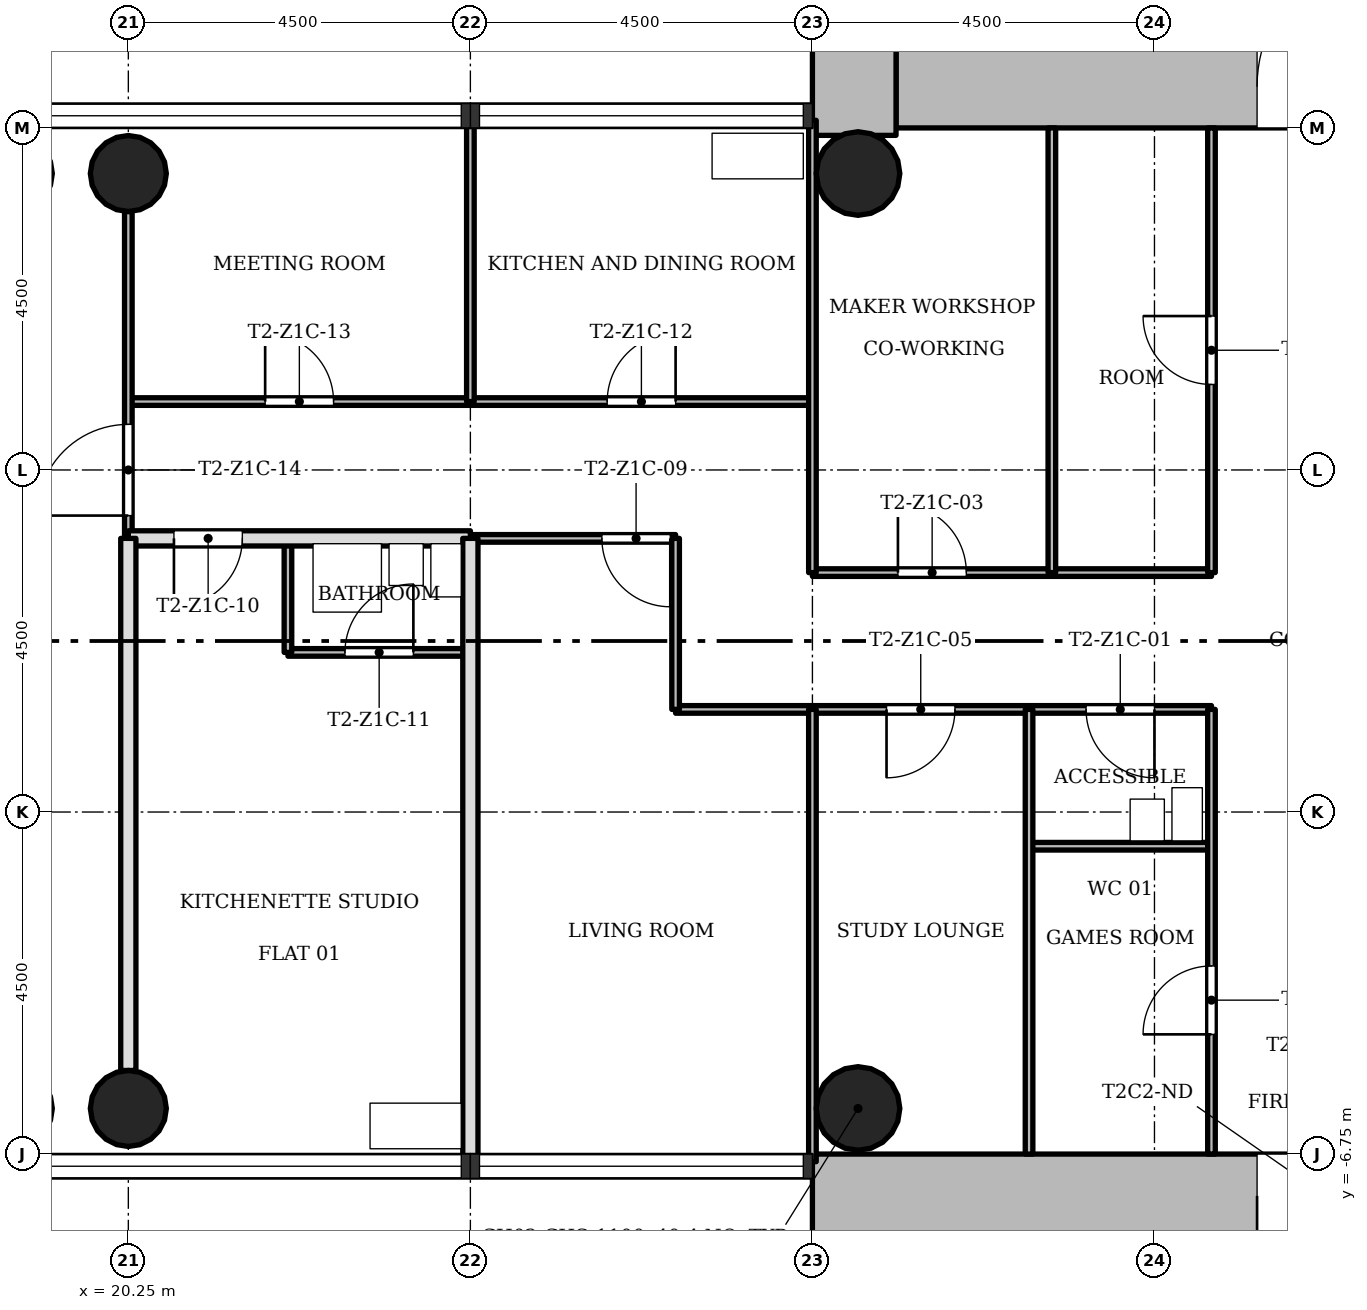
"""IFC4 building model, lengths in metres.
Left out: names, types, materials, properties, quantities, classifications, styles, units other than length and angle.
Written with IfcOpenShell. Run it as: python <this file> out.ifc"""

import sys

from ifc_helpers import new_model, si_unit, direction, frame, frame_2d, origin, origin_2d, place, context, subcontext, project, spatial, rectangle, hollow_circle, extrude, element, fill, save


model = new_model("IFC4")
c1 = context("Model", 3, precision=1e-05, world=origin(), true_north=direction((0.0, 1.0)))
c2 = subcontext(c1, "Body", "Model", "MODEL_VIEW")
j1 = project(units=[si_unit("LENGTHUNIT", "METRE"), si_unit("PLANEANGLEUNIT", "RADIAN")], contexts=[c1])
p1 = place(None, origin())
s1 = spatial("IfcSite", under=j1, at=p1, CompositionType="ELEMENT")
p2 = place(p1, origin())
s2 = spatial("IfcBuilding", under=s1, at=p2, CompositionType="ELEMENT")
p3 = place(p2, frame((0.0, 0.0, 48.3)))
s3 = spatial("IfcBuildingStorey", under=s2, at=p3, CompositionType="ELEMENT", Elevation=48.3)
p4 = place(p3, frame((30.35, 7.3, 0.0), z_axis=(0.0, 0.0, 1.0), x_axis=(1.0, 0.0, 0.0)))
e1 = element("IfcWall", 1, at=p4, inside=s3, PredefinedType="SHEAR", context=c2, shape_type="SweptSolid", body=[
    extrude(rectangle(XDim=12.4, YDim=1.1, at=frame_2d((6.2, 0.0))), origin(), (0.0, 0.0, 1.0), 3.4),
])
p5 = place(p4, frame((4.75, 0.0, 0.0)))
e2 = element("IfcOpeningElement", 2, at=p5, cuts=e1, PredefinedType="OPENING", context=c2, shape_type="SweptSolid", body=[
    extrude(rectangle(XDim=1.8, YDim=2.1, at=frame_2d((0.9, 1.05))), frame((0.0, 0.56, 0.0), z_axis=(0.0, -1.0, 0.0), x_axis=(1.0, 0.0, 0.0)), (0.0, 0.0, 1.0), 1.12),
])
p6 = place(p3, frame((29.8, 15.248, 0.0), z_axis=(0.0, 0.0, 1.0), x_axis=(0.0, -1.0, 0.0)))
e3 = element("IfcWall", 3, at=p6, inside=s3, PredefinedType="SHEAR", context=c2, shape_type="SweptSolid", body=[
    extrude(rectangle(XDim=8.596, YDim=1.1, at=frame_2d((4.298, 0.0))), origin(), (0.0, 0.0, 1.0), 3.4),
])
p7 = place(p3, frame((41.65, -7.3, 0.0), z_axis=(0.0, 0.0, 1.0), x_axis=(-1.0, 0.0, 0.0)))
e4 = element("IfcWall", 4, at=p7, inside=s3, PredefinedType="SHEAR", context=c2, shape_type="SweptSolid", body=[
    extrude(rectangle(XDim=12.4, YDim=1.1, at=frame_2d((6.2, 0.0))), origin(), (0.0, 0.0, 1.0), 3.4),
])
p8 = place(p7, frame((4.75, 0.0, 0.0)))
e5 = element("IfcOpeningElement", 5, at=p8, cuts=e4, PredefinedType="OPENING", context=c2, shape_type="SweptSolid", body=[
    extrude(rectangle(XDim=1.8, YDim=2.1, at=frame_2d((0.9, 1.05))), frame((0.0, 0.56, 0.0), z_axis=(0.0, -1.0, 0.0), x_axis=(1.0, 0.0, 0.0)), (0.0, 0.0, 1.0), 1.12),
])
for number, where, z_axis, x_axis in (
    (6, (20.25, 6.15, 0.0), (0.0, 0.0, 1.0), (1.0, 0.0, 0.0)),
    (7, (20.25, -6.15, 0.0), (0.0, 0.0, 1.0), (1.0, 0.0, 0.0)),
):
    element("IfcColumn", number, at=place(p3, frame(where, z_axis=z_axis, x_axis=x_axis)), inside=s3, PredefinedType="COLUMN", context=c2, shape_type="SweptSolid", body=[
        extrude(hollow_circle(Radius=0.5, WallThickness=0.036, at=origin_2d()), origin(), (0.0, 0.0, 1.0), 3.4),
    ])
for number, where, z_axis, x_axis in (
    (8, (29.85, 6.15, 0.0), (0.0, 0.0, 1.0), (1.0, 0.0, 0.0)),
    (9, (29.85, -6.15, 0.0), (0.0, 0.0, 1.0), (1.0, 0.0, 0.0)),
):
    element("IfcColumn", number, at=place(p3, frame(where, z_axis=z_axis, x_axis=x_axis)), inside=s3, PredefinedType="COLUMN", context=c2, shape_type="SweptSolid", body=[
        extrude(hollow_circle(Radius=0.55, WallThickness=0.04, at=origin_2d()), origin(), (0.0, 0.0, 1.0), 3.4),
    ])
p9 = place(p3, frame((34.5, -2.7, 0.0), z_axis=(0.0, 0.0, 1.0), x_axis=(-1.0, 0.0, 0.0)))
e10 = element("IfcWall", 10, at=p9, inside=s3, PredefinedType="PARTITIONING", context=c2, shape_type="SweptSolid", body=[
    extrude(rectangle(XDim=2.4, YDim=0.1, at=frame_2d((1.2, 0.0))), origin(), (0.0, 0.0, 1.0), 3.0),
])
p10 = place(p3, frame((34.5, -0.9, 0.0), z_axis=(0.0, 0.0, 1.0), x_axis=(-1.0, 0.0, 0.0)))
e11 = element("IfcWall", 11, at=p10, inside=s3, PredefinedType="PARTITIONING", context=c2, shape_type="SweptSolid", body=[
    extrude(rectangle(XDim=7.05, YDim=0.1, at=frame_2d((3.525, 0.0))), origin(), (0.0, 0.0, 1.0), 3.0),
])
p11 = place(p10, frame((0.75, 0.0, 0.0)))
e12 = element("IfcOpeningElement", 12, at=p11, cuts=e11, PredefinedType="OPENING", context=c2, shape_type="SweptSolid", body=[
    extrude(rectangle(XDim=0.9, YDim=2.1, at=frame_2d((0.45, 1.05))), frame((0.0, 0.06, 0.0), z_axis=(0.0, -1.0, 0.0), x_axis=(1.0, 0.0, 0.0)), (0.0, 0.0, 1.0), 0.12),
])
p12 = place(p10, frame((3.375, 0.0, 0.0)))
e13 = element("IfcOpeningElement", 13, at=p12, cuts=e11, PredefinedType="OPENING", context=c2, shape_type="SweptSolid", body=[
    extrude(rectangle(XDim=0.9, YDim=2.1, at=frame_2d((0.45, 1.05))), frame((0.0, 0.06, 0.0), z_axis=(0.0, -1.0, 0.0), x_axis=(1.0, 0.0, 0.0)), (0.0, 0.0, 1.0), 0.12),
])
p13 = place(p3, frame((24.75, -0.15, 0.0), z_axis=(0.0, 0.0, 1.0), x_axis=(-1.0, 0.0, 0.0)))
e14 = element("IfcWall", 14, at=p13, inside=s3, PredefinedType="PARTITIONING", context=c2, shape_type="SweptSolid", body=[
    extrude(rectangle(XDim=2.4, YDim=0.1, at=frame_2d((1.2, 0.0))), origin(), (0.0, 0.0, 1.0), 3.0),
])
p14 = place(p13, frame((0.75, 0.0, 0.0)))
e15 = element("IfcOpeningElement", 15, at=p14, cuts=e14, PredefinedType="OPENING", context=c2, shape_type="SweptSolid", body=[
    extrude(rectangle(XDim=0.9, YDim=2.1, at=frame_2d((0.45, 1.05))), frame((0.0, 0.06, 0.0), z_axis=(0.0, -1.0, 0.0), x_axis=(1.0, 0.0, 0.0)), (0.0, 0.0, 1.0), 0.12),
])
p15 = place(p3, frame((34.5, 0.9, 0.0), z_axis=(0.0, 0.0, 1.0), x_axis=(-1.0, 0.0, 0.0)))
e16 = element("IfcWall", 16, at=p15, inside=s3, PredefinedType="PARTITIONING", context=c2, shape_type="SweptSolid", body=[
    extrude(rectangle(XDim=5.25, YDim=0.1, at=frame_2d((2.625, 0.0))), origin(), (0.0, 0.0, 1.0), 3.0),
])
p16 = place(p15, frame((3.225, 0.0, 0.0)))
e17 = element("IfcOpeningElement", 17, at=p16, cuts=e16, PredefinedType="OPENING", context=c2, shape_type="SweptSolid", body=[
    extrude(rectangle(XDim=0.9, YDim=2.1, at=frame_2d((0.45, 1.05))), frame((0.0, 0.06, 0.0), z_axis=(0.0, -1.0, 0.0), x_axis=(1.0, 0.0, 0.0)), (0.0, 0.0, 1.0), 0.12),
])
p17 = place(p3, frame((27.45, 1.35, 0.0), z_axis=(0.0, 0.0, 1.0), x_axis=(-1.0, 0.0, 0.0)))
e18 = element("IfcWall", 18, at=p17, inside=s3, PredefinedType="PARTITIONING", context=c2, shape_type="SweptSolid", body=[
    extrude(rectangle(XDim=2.7, YDim=0.1, at=frame_2d((1.35, 0.0))), origin(), (0.0, 0.0, 1.0), 3.0),
])
p18 = place(p17, frame((0.07, 0.0, 0.0)))
e19 = element("IfcOpeningElement", 19, at=p18, cuts=e18, PredefinedType="OPENING", context=c2, shape_type="SweptSolid", body=[
    extrude(rectangle(XDim=0.9, YDim=2.1, at=frame_2d((0.45, 1.05))), frame((0.0, 0.06, 0.0), z_axis=(0.0, -1.0, 0.0), x_axis=(1.0, 0.0, 0.0)), (0.0, 0.0, 1.0), 0.12),
])
p19 = place(p3, frame((24.75, 1.35, 0.0), z_axis=(0.0, 0.0, 1.0), x_axis=(-1.0, 0.0, 0.0)))
e20 = element("IfcWall", 20, at=p19, inside=s3, PredefinedType="SOLIDWALL", context=c2, shape_type="SweptSolid", body=[
    extrude(rectangle(XDim=4.5, YDim=0.2, at=frame_2d((2.25, 0.0))), origin(), (0.0, 0.0, 1.0), 3.0),
])
p20 = place(p19, frame((3.0, 0.0, 0.0)))
e21 = element("IfcOpeningElement", 21, at=p20, cuts=e20, PredefinedType="OPENING", context=c2, shape_type="SweptSolid", body=[
    extrude(rectangle(XDim=0.9, YDim=2.1, at=frame_2d((0.45, 1.05))), frame((0.0, 0.11, 0.0), z_axis=(0.0, -1.0, 0.0), x_axis=(1.0, 0.0, 0.0)), (0.0, 0.0, 1.0), 0.22),
])
p21 = place(p3, frame((29.25, 3.15, 0.0), z_axis=(0.0, 0.0, 1.0), x_axis=(-1.0, 0.0, 0.0)))
e22 = element("IfcWall", 22, at=p21, inside=s3, PredefinedType="PARTITIONING", context=c2, shape_type="SweptSolid", body=[
    extrude(rectangle(XDim=9.0, YDim=0.1, at=frame_2d((4.5, 0.0))), origin(), (0.0, 0.0, 1.0), 3.0),
])
p22 = place(p21, frame((1.8, 0.0, 0.0)))
e23 = element("IfcOpeningElement", 23, at=p22, cuts=e22, PredefinedType="OPENING", context=c2, shape_type="SweptSolid", body=[
    extrude(rectangle(XDim=0.9, YDim=2.1, at=frame_2d((0.45, 1.05))), frame((0.0, 0.06, 0.0), z_axis=(0.0, -1.0, 0.0), x_axis=(1.0, 0.0, 0.0)), (0.0, 0.0, 1.0), 0.12),
])
p23 = place(p21, frame((6.3, 0.0, 0.0)))
e24 = element("IfcOpeningElement", 24, at=p23, cuts=e22, PredefinedType="OPENING", context=c2, shape_type="SweptSolid", body=[
    extrude(rectangle(XDim=0.9, YDim=2.1, at=frame_2d((0.45, 1.05))), frame((0.0, 0.06, 0.0), z_axis=(0.0, -1.0, 0.0), x_axis=(1.0, 0.0, 0.0)), (0.0, 0.0, 1.0), 0.12),
])
p24 = place(p3, frame((34.5, -6.75, 0.0), z_axis=(0.0, 0.0, 1.0), x_axis=(0.0, 1.0, 0.0)))
e25 = element("IfcWall", 25, at=p24, inside=s3, PredefinedType="PARTITIONING", context=c2, shape_type="SweptSolid", body=[
    extrude(rectangle(XDim=5.85, YDim=0.1, at=frame_2d((2.925, 0.0))), origin(), (0.0, 0.0, 1.0), 3.0),
])
p25 = place(p24, frame((1.575, 0.0, 0.0)))
e26 = element("IfcOpeningElement", 26, at=p25, cuts=e25, PredefinedType="OPENING", context=c2, shape_type="SweptSolid", body=[
    extrude(rectangle(XDim=0.9, YDim=2.1, at=frame_2d((0.45, 1.05))), frame((0.0, 0.06, 0.0), z_axis=(0.0, -1.0, 0.0), x_axis=(1.0, 0.0, 0.0)), (0.0, 0.0, 1.0), 0.12),
])
p26 = place(p3, frame((34.5, 0.9, 0.0), z_axis=(0.0, 0.0, 1.0), x_axis=(0.0, 1.0, 0.0)))
e27 = element("IfcWall", 27, at=p26, inside=s3, PredefinedType="PARTITIONING", context=c2, shape_type="SweptSolid", body=[
    extrude(rectangle(XDim=5.85, YDim=0.1, at=frame_2d((2.925, 0.0))), origin(), (0.0, 0.0, 1.0), 3.0),
])
p27 = place(p26, frame((2.475, 0.0, 0.0)))
e28 = element("IfcOpeningElement", 28, at=p27, cuts=e27, PredefinedType="OPENING", context=c2, shape_type="SweptSolid", body=[
    extrude(rectangle(XDim=0.9, YDim=2.1, at=frame_2d((0.45, 1.05))), frame((0.0, 0.06, 0.0), z_axis=(0.0, -1.0, 0.0), x_axis=(1.0, 0.0, 0.0)), (0.0, 0.0, 1.0), 0.12),
])
for number, where, z_axis, x_axis in (
    (29, (32.4, 0.9, 0.0), (0.0, 0.0, 1.0), (0.0, 1.0, 0.0)),
    (30, (32.1, -6.75, 0.0), (0.0, 0.0, 1.0), (0.0, 1.0, 0.0)),
):
    element("IfcWall", number, at=place(p3, frame(where, z_axis=z_axis, x_axis=x_axis)), inside=s3, PredefinedType="PARTITIONING", context=c2, shape_type="SweptSolid", body=[
        extrude(rectangle(XDim=5.85, YDim=0.1, at=frame_2d((2.925, 0.0))), origin(), (0.0, 0.0, 1.0), 3.0),
    ])
for number, where, z_axis, x_axis in (
    (31, (29.25, -6.85, 0.0), (0.0, 0.0, 1.0), (0.0, 1.0, 0.0)),
    (32, (29.25, 0.9, 0.0), (0.0, 0.0, 1.0), (0.0, 1.0, 0.0)),
):
    element("IfcWall", number, at=place(p3, frame(where, z_axis=z_axis, x_axis=x_axis)), inside=s3, PredefinedType="PARTITIONING", context=c2, shape_type="SweptSolid", body=[
        extrude(rectangle(XDim=5.95, YDim=0.1, at=frame_2d((2.975, 0.0))), origin(), (0.0, 0.0, 1.0), 3.0),
    ])
p28 = place(p3, frame((27.45, -0.9, 0.0), z_axis=(0.0, 0.0, 1.0), x_axis=(0.0, 1.0, 0.0)))
e33 = element("IfcWall", 33, at=p28, inside=s3, PredefinedType="PARTITIONING", context=c2, shape_type="SweptSolid", body=[
    extrude(rectangle(XDim=2.25, YDim=0.1, at=frame_2d((1.125, 0.0))), origin(), (0.0, 0.0, 1.0), 3.0),
])
p29 = place(p3, frame((24.75, 3.15, 0.0), z_axis=(0.0, 0.0, 1.0), x_axis=(0.0, 1.0, 0.0)))
e34 = element("IfcWall", 34, at=p29, inside=s3, PredefinedType="PARTITIONING", context=c2, shape_type="SweptSolid", body=[
    extrude(rectangle(XDim=3.7, YDim=0.1, at=frame_2d((1.85, 0.0))), origin(), (0.0, 0.0, 1.0), 3.0),
])
p30 = place(p3, frame((24.75, -6.85, 0.0), z_axis=(0.0, 0.0, 1.0), x_axis=(0.0, 1.0, 0.0)))
e35 = element("IfcWall", 35, at=p30, inside=s3, PredefinedType="SOLIDWALL", context=c2, shape_type="SweptSolid", body=[
    extrude(rectangle(XDim=8.2, YDim=0.2, at=frame_2d((4.1, 0.0))), origin(), (0.0, 0.0, 1.0), 3.0),
])
p31 = place(p3, frame((22.35, -0.15, 0.0), z_axis=(0.0, 0.0, 1.0), x_axis=(0.0, 1.0, 0.0)))
e36 = element("IfcWall", 36, at=p31, inside=s3, PredefinedType="PARTITIONING", context=c2, shape_type="SweptSolid", body=[
    extrude(rectangle(XDim=1.5, YDim=0.1, at=frame_2d((0.75, 0.0))), origin(), (0.0, 0.0, 1.0), 3.0),
])
p32 = place(p3, frame((20.25, 1.35, 0.0), z_axis=(0.0, 0.0, 1.0), x_axis=(0.0, 1.0, 0.0)))
e37 = element("IfcWall", 37, at=p32, inside=s3, PredefinedType="PARTITIONING", context=c2, shape_type="SweptSolid", body=[
    extrude(rectangle(XDim=4.3, YDim=0.1, at=frame_2d((2.15, 0.0))), origin(), (0.0, 0.0, 1.0), 3.0),
])
p33 = place(p32, frame((0.3, 0.0, 0.0)))
e38 = element("IfcOpeningElement", 38, at=p33, cuts=e37, PredefinedType="OPENING", context=c2, shape_type="SweptSolid", body=[
    extrude(rectangle(XDim=1.2, YDim=2.1, at=frame_2d((0.6, 1.05))), frame((0.0, 0.06, 0.0), z_axis=(0.0, -1.0, 0.0), x_axis=(1.0, 0.0, 0.0)), (0.0, 0.0, 1.0), 0.12),
])
p34 = place(p3, frame((20.25, -5.65, 0.0), z_axis=(0.0, 0.0, 1.0), x_axis=(0.0, 1.0, 0.0)))
e39 = element("IfcWall", 39, at=p34, inside=s3, PredefinedType="SOLIDWALL", context=c2, shape_type="SweptSolid", body=[
    extrude(rectangle(XDim=7.0, YDim=0.2, at=frame_2d((3.5, 0.0))), origin(), (0.0, 0.0, 1.0), 3.0),
])
p35 = place(p11, origin())
e40 = element("IfcDoor", 40, at=p35, inside=s3, OperationType="SINGLE_SWING_RIGHT", PredefinedType="DOOR", context=c2, shape_type="SweptSolid", body=[
    extrude(rectangle(XDim=0.9, YDim=2.1, at=frame_2d((0.45, 1.05))), frame((0.0, 0.025, 0.0), z_axis=(0.0, -1.0, 0.0), x_axis=(1.0, 0.0, 0.0)), (0.0, 0.0, 1.0), 0.05),
])
fill(e12, e40)
p36 = place(p27, origin())
e41 = element("IfcDoor", 41, at=p36, inside=s3, OperationType="SINGLE_SWING_LEFT", PredefinedType="DOOR", context=c2, shape_type="SweptSolid", body=[
    extrude(rectangle(XDim=0.9, YDim=2.1, at=frame_2d((0.45, 1.05))), frame((0.0, 0.025, 0.0), z_axis=(0.0, -1.0, 0.0), x_axis=(1.0, 0.0, 0.0)), (0.0, 0.0, 1.0), 0.05),
])
fill(e28, e41)
p37 = place(p16, origin())
e42 = element("IfcDoor", 42, at=p37, inside=s3, OperationType="SINGLE_SWING_RIGHT", PredefinedType="DOOR", context=c2, shape_type="SweptSolid", body=[
    extrude(rectangle(XDim=0.9, YDim=2.1, at=frame_2d((0.45, 1.05))), frame((0.0, 0.025, 0.0), z_axis=(0.0, -1.0, 0.0), x_axis=(1.0, 0.0, 0.0)), (0.0, 0.0, 1.0), 0.05),
])
fill(e17, e42)
p38 = place(p25, origin())
e43 = element("IfcDoor", 43, at=p38, inside=s3, OperationType="SINGLE_SWING_RIGHT", PredefinedType="DOOR", context=c2, shape_type="SweptSolid", body=[
    extrude(rectangle(XDim=0.9, YDim=2.1, at=frame_2d((0.45, 1.05))), frame((0.0, 0.025, 0.0), z_axis=(0.0, -1.0, 0.0), x_axis=(1.0, 0.0, 0.0)), (0.0, 0.0, 1.0), 0.05),
])
fill(e26, e43)
p39 = place(p12, origin())
e44 = element("IfcDoor", 44, at=p39, inside=s3, OperationType="SINGLE_SWING_LEFT", PredefinedType="DOOR", context=c2, shape_type="SweptSolid", body=[
    extrude(rectangle(XDim=0.9, YDim=2.1, at=frame_2d((0.45, 1.05))), frame((0.0, 0.025, 0.0), z_axis=(0.0, -1.0, 0.0), x_axis=(1.0, 0.0, 0.0)), (0.0, 0.0, 1.0), 0.05),
])
fill(e13, e44)
p40 = place(p18, origin())
e45 = element("IfcDoor", 45, at=p40, inside=s3, OperationType="SINGLE_SWING_RIGHT", PredefinedType="DOOR", context=c2, shape_type="SweptSolid", body=[
    extrude(rectangle(XDim=0.9, YDim=2.1, at=frame_2d((0.45, 1.05))), frame((0.0, 0.025, 0.0), z_axis=(0.0, -1.0, 0.0), x_axis=(1.0, 0.0, 0.0)), (0.0, 0.0, 1.0), 0.05),
])
fill(e19, e45)
p41 = place(p20, origin())
e46 = element("IfcDoor", 46, at=p41, inside=s3, OperationType="SINGLE_SWING_LEFT", PredefinedType="DOOR", context=c2, shape_type="SweptSolid", body=[
    extrude(rectangle(XDim=0.9, YDim=2.1, at=frame_2d((0.45, 1.05))), frame((0.0, 0.025, 0.0), z_axis=(0.0, -1.0, 0.0), x_axis=(1.0, 0.0, 0.0)), (0.0, 0.0, 1.0), 0.05),
])
fill(e21, e46)
p42 = place(p14, origin())
e47 = element("IfcDoor", 47, at=p42, inside=s3, OperationType="SINGLE_SWING_LEFT", PredefinedType="DOOR", context=c2, shape_type="SweptSolid", body=[
    extrude(rectangle(XDim=0.9, YDim=2.1, at=frame_2d((0.45, 1.05))), frame((0.0, 0.025, 0.0), z_axis=(0.0, -1.0, 0.0), x_axis=(1.0, 0.0, 0.0)), (0.0, 0.0, 1.0), 0.05),
])
fill(e15, e47)
p43 = place(p22, origin())
e48 = element("IfcDoor", 48, at=p43, inside=s3, OperationType="SINGLE_SWING_LEFT", PredefinedType="DOOR", context=c2, shape_type="SweptSolid", body=[
    extrude(rectangle(XDim=0.9, YDim=2.1, at=frame_2d((0.45, 1.05))), frame((0.0, 0.025, 0.0), z_axis=(0.0, -1.0, 0.0), x_axis=(1.0, 0.0, 0.0)), (0.0, 0.0, 1.0), 0.05),
])
fill(e23, e48)
p44 = place(p23, origin())
e49 = element("IfcDoor", 49, at=p44, inside=s3, OperationType="SINGLE_SWING_RIGHT", PredefinedType="DOOR", context=c2, shape_type="SweptSolid", body=[
    extrude(rectangle(XDim=0.9, YDim=2.1, at=frame_2d((0.45, 1.05))), frame((0.0, 0.025, 0.0), z_axis=(0.0, -1.0, 0.0), x_axis=(1.0, 0.0, 0.0)), (0.0, 0.0, 1.0), 0.05),
])
fill(e24, e49)
p45 = place(p33, origin())
e50 = element("IfcDoor", 50, at=p45, inside=s3, OperationType="SINGLE_SWING_RIGHT", PredefinedType="DOOR", context=c2, shape_type="SweptSolid", body=[
    extrude(rectangle(XDim=1.2, YDim=2.1, at=frame_2d((0.6, 1.05))), frame((0.0, 0.025, 0.0), z_axis=(0.0, -1.0, 0.0), x_axis=(1.0, 0.0, 0.0)), (0.0, 0.0, 1.0), 0.05),
])
fill(e38, e50)
p46 = place(p5, origin())
e51 = element("IfcDoor", 51, at=p46, inside=s3, OperationType="SINGLE_SWING_LEFT", PredefinedType="DOOR", context=c2, shape_type="SweptSolid", body=[
    extrude(rectangle(XDim=1.8, YDim=2.1, at=frame_2d((0.9, 1.05))), frame((0.0, 0.025, 0.0), z_axis=(0.0, -1.0, 0.0), x_axis=(1.0, 0.0, 0.0)), (0.0, 0.0, 1.0), 0.05),
])
fill(e2, e51)
p47 = place(p8, origin())
e52 = element("IfcDoor", 52, at=p47, inside=s3, OperationType="SINGLE_SWING_LEFT", PredefinedType="DOOR", context=c2, shape_type="SweptSolid", body=[
    extrude(rectangle(XDim=1.8, YDim=2.1, at=frame_2d((0.9, 1.05))), frame((0.0, 0.025, 0.0), z_axis=(0.0, -1.0, 0.0), x_axis=(1.0, 0.0, 0.0)), (0.0, 0.0, 1.0), 0.05),
])
fill(e5, e52)
save(model, sys.argv[1])
